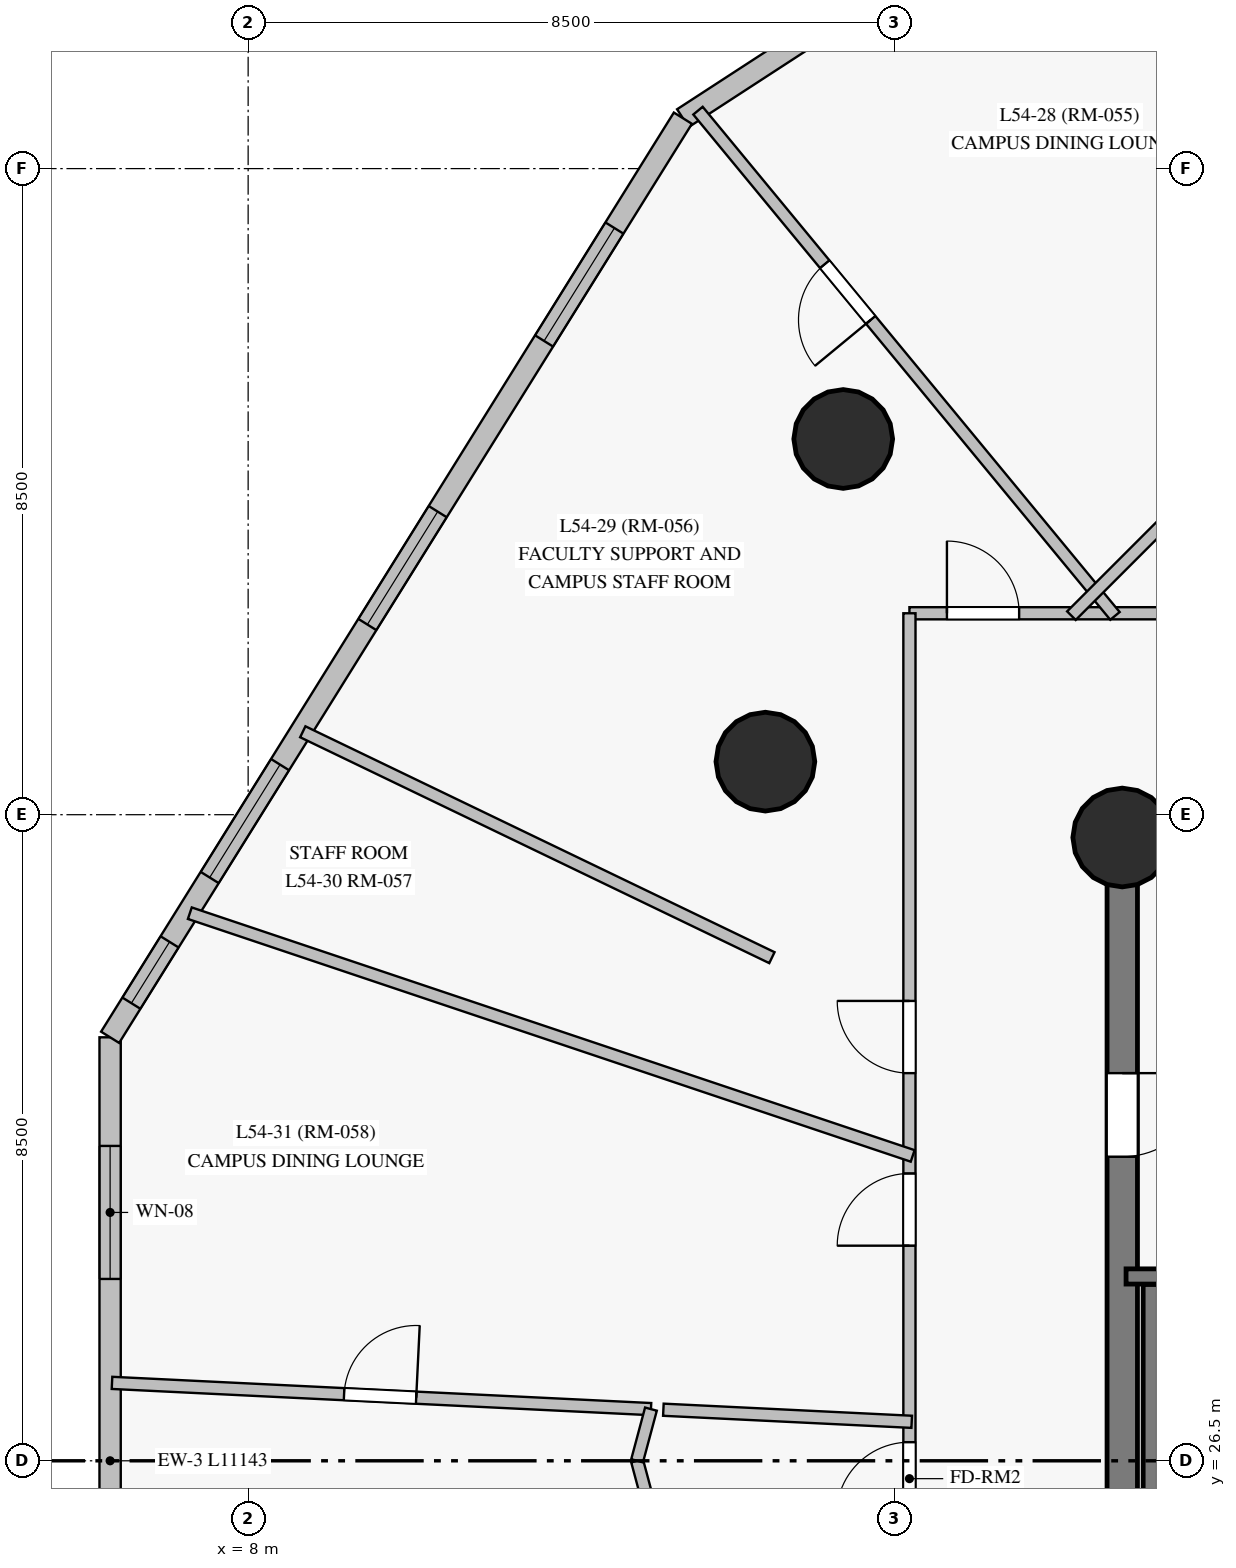
"""IFC4 building model, lengths in metres.
Left out: names, types, materials, properties, quantities, classifications, styles, units other than length and angle.
Written with IfcOpenShell. Run it as: python <this file> out.ifc"""

import sys

from ifc_helpers import new_model, si_unit, direction, frame, frame_2d, origin, origin_with_axes, origin_2d, place, context, subcontext, project, spatial, rectangle, circle, extrude, source, transform, mapped, element, fill, save


model = new_model("IFC4")
c1 = context("Model", 3, precision=1e-05, world=origin(), true_north=direction((0.0, 1.0)))
c2 = subcontext(c1, "Body", "Model", "MODEL_VIEW")
j1 = project(units=[si_unit("LENGTHUNIT", "METRE"), si_unit("PLANEANGLEUNIT", "RADIAN")], contexts=[c1])
p1 = place(None, origin())
s1 = spatial("IfcSite", under=j1, at=p1, CompositionType="ELEMENT")
p2 = place(p1, origin())
s2 = spatial("IfcBuilding", under=s1, at=p2, CompositionType="ELEMENT")
p3 = place(p2, frame((0.0, 0.0, 187.05)))
s3 = spatial("IfcBuildingStorey", under=s2, at=p3, CompositionType="ELEMENT", Elevation=187.05)
p4 = place(p3, frame((26.55, 34.7, 0.0), z_axis=(0.0, 0.0, 1.0), x_axis=(-1.0, 0.0, 0.0)))
e1 = element("IfcWall", 1, at=p4, inside=s3, PredefinedType="SHEAR", context=c2, shape_type="SweptSolid", body=[
    extrude(rectangle(XDim=7.05, YDim=0.4, at=frame_2d((3.525, 0.0))), origin(), (0.0, 0.0, 1.0), 2.825),
])
p5 = place(p4, frame((4.25, 0.0, 0.0)))
e2 = element("IfcOpeningElement", 2, at=p5, cuts=e1, PredefinedType="OPENING", context=c2, shape_type="SweptSolid", body=[
    extrude(rectangle(XDim=1.1, YDim=2.15, at=frame_2d((0.55, 1.075))), frame((0.0, 0.21, 0.0), z_axis=(0.0, -1.0, 0.0), x_axis=(1.0, 0.0, 0.0)), (0.0, 0.0, 1.0), 0.42),
])
p6 = place(p3, frame((19.5, 34.7, 0.0), z_axis=(0.0, 0.0, 1.0), x_axis=(0.0, -1.0, 0.0)))
e3 = element("IfcWall", 3, at=p6, inside=s3, PredefinedType="SHEAR", context=c2, shape_type="SweptSolid", body=[
    extrude(rectangle(XDim=16.4, YDim=0.4, at=frame_2d((8.2, 0.0))), origin(), (0.0, 0.0, 1.0), 2.825),
])
p7 = place(p6, frame((3.1, 0.0, 0.0)))
e4 = element("IfcOpeningElement", 4, at=p7, cuts=e3, PredefinedType="OPENING", context=c2, shape_type="SweptSolid", body=[
    extrude(rectangle(XDim=1.1, YDim=2.15, at=frame_2d((0.55, 1.075))), frame((0.0, 0.21, 0.0), z_axis=(0.0, -1.0, 0.0), x_axis=(1.0, 0.0, 0.0)), (0.0, 0.0, 1.0), 0.42),
])
m1 = source(origin_with_axes(), c2, "Body", "SweptSolid", [
    extrude(circle(Radius=0.65, at=origin_2d()), origin(), (0.0, 0.0, 1.0), 3.05),
])
for number, where, z_axis, x_axis in (
    (5, (19.5, 34.7, 0.0), (0.0, 0.0, 1.0), (1.0, 0.0, 0.0)),
    (6, (15.829, 39.943, 0.0), (0.0, 0.0, 1.0), (1.0, 0.0, 0.0)),
    (7, (14.805, 35.698, 0.0), (0.0, 0.0, 1.0), (1.0, 0.0, 0.0)),
):
    element("IfcColumn", number, at=place(p3, frame(where, z_axis=z_axis, x_axis=x_axis)), inside=s3, PredefinedType="COLUMN", context=c2, shape_type="MappedRepresentation", body=[
        mapped(m1, transform((0.0, 0.0, 0.0), scale=1.0)),
    ])
p8 = place(p3, frame((6.184, 32.071, 0.0), z_axis=(0.0, 0.0, 1.0), x_axis=(0.0, -1.0, 0.0)))
e8 = element("IfcWall", 8, at=p8, inside=s3, PredefinedType="SOLIDWALL", context=c2, shape_type="SweptSolid", body=[
    extrude(rectangle(XDim=11.143, YDim=0.28, at=frame_2d((5.571, 0.0))), origin(), (0.0, 0.0, 1.0), 2.825),
])
p9 = place(p8, frame((1.429, 0.0, 0.85)))
e9 = element("IfcOpeningElement", 9, at=p9, cuts=e8, PredefinedType="OPENING", context=c2, shape_type="SweptSolid", body=[
    extrude(rectangle(XDim=1.75, YDim=1.65, at=frame_2d((0.875, 0.825))), frame((0.0, 0.15, 0.0), z_axis=(0.0, -1.0, 0.0), x_axis=(1.0, 0.0, 0.0)), (0.0, 0.0, 1.0), 0.3),
])
p10 = place(p8, frame((6.94, 0.0, 0.85)))
e10 = element("IfcOpeningElement", 10, at=p10, cuts=e8, PredefinedType="OPENING", context=c2, shape_type="SweptSolid", body=[
    extrude(rectangle(XDim=1.75, YDim=1.65, at=frame_2d((0.875, 0.825))), frame((0.0, 0.15, 0.0), z_axis=(0.0, -1.0, 0.0), x_axis=(1.0, 0.0, 0.0)), (0.0, 0.0, 1.0), 0.3),
])
p11 = place(p3, frame((22.307, 49.747, 0.0), z_axis=(0.0, 0.0, 1.0), x_axis=(-0.838379351777, -0.545087206339, 0.0)))
e11 = element("IfcWall", 11, at=p11, inside=s3, PredefinedType="SOLIDWALL", context=c2, shape_type="SweptSolid", body=[
    extrude(rectangle(XDim=10.243, YDim=0.28, at=frame_2d((5.122, 0.0))), origin(), (0.0, 0.0, 1.0), 2.825),
])
p12 = place(p11, frame((0.563, 0.0, 0.85)))
e12 = element("IfcOpeningElement", 12, at=p12, cuts=e11, PredefinedType="OPENING", context=c2, shape_type="SweptSolid", body=[
    extrude(rectangle(XDim=1.55, YDim=1.65, at=frame_2d((0.775, 0.825))), frame((0.0, 0.15, 0.0), z_axis=(0.0, -1.0, 0.0), x_axis=(1.0, 0.0, 0.0)), (0.0, 0.0, 1.0), 0.3),
])
p13 = place(p11, frame((5.442, 0.0, 0.85)))
e13 = element("IfcOpeningElement", 13, at=p13, cuts=e11, PredefinedType="OPENING", context=c2, shape_type="SweptSolid", body=[
    extrude(rectangle(XDim=1.75, YDim=1.65, at=frame_2d((0.875, 0.825))), frame((0.0, 0.15, 0.0), z_axis=(0.0, -1.0, 0.0), x_axis=(1.0, 0.0, 0.0)), (0.0, 0.0, 1.0), 0.3),
])
p14 = place(p3, frame((13.719, 44.163, 0.0), z_axis=(0.0, 0.0, 1.0), x_axis=(-0.52888179639, -0.848695496304, 0.0)))
e14 = element("IfcWall", 14, at=p14, inside=s3, PredefinedType="SOLIDWALL", context=c2, shape_type="SweptSolid", body=[
    extrude(rectangle(XDim=14.248, YDim=0.28, at=frame_2d((7.124, 0.0))), origin(), (0.0, 0.0, 1.0), 2.825),
])
p15 = place(p14, frame((1.703, 0.0, 0.85)))
e15 = element("IfcOpeningElement", 15, at=p15, cuts=e14, PredefinedType="OPENING", context=c2, shape_type="SweptSolid", body=[
    extrude(rectangle(XDim=1.75, YDim=1.65, at=frame_2d((0.875, 0.825))), frame((0.0, 0.15, 0.0), z_axis=(0.0, -1.0, 0.0), x_axis=(1.0, 0.0, 0.0)), (0.0, 0.0, 1.0), 0.3),
])
p16 = place(p14, frame((6.099, 0.0, 0.85)))
e16 = element("IfcOpeningElement", 16, at=p16, cuts=e14, PredefinedType="OPENING", context=c2, shape_type="SweptSolid", body=[
    extrude(rectangle(XDim=1.75, YDim=1.65, at=frame_2d((0.875, 0.825))), frame((0.0, 0.15, 0.0), z_axis=(0.0, -1.0, 0.0), x_axis=(1.0, 0.0, 0.0)), (0.0, 0.0, 1.0), 0.3),
])
p17 = place(p14, frame((10.021, 0.0, 0.85)))
e17 = element("IfcOpeningElement", 17, at=p17, cuts=e14, PredefinedType="OPENING", context=c2, shape_type="SweptSolid", body=[
    extrude(rectangle(XDim=1.75, YDim=1.65, at=frame_2d((0.875, 0.825))), frame((0.0, 0.15, 0.0), z_axis=(0.0, -1.0, 0.0), x_axis=(1.0, 0.0, 0.0)), (0.0, 0.0, 1.0), 0.3),
])
p18 = place(p14, frame((12.769, 0.0, 0.85)))
e18 = element("IfcOpeningElement", 18, at=p18, cuts=e14, PredefinedType="OPENING", context=c2, shape_type="SweptSolid", body=[
    extrude(rectangle(XDim=0.95, YDim=1.5, at=frame_2d((0.475, 0.75))), frame((0.0, 0.15, 0.0), z_axis=(0.0, -1.0, 0.0), x_axis=(1.0, 0.0, 0.0)), (0.0, 0.0, 1.0), 0.3),
])
p19 = place(p3, frame((19.875, 21.32, 0.0), z_axis=(0.0, 0.0, 1.0), x_axis=(0.0, 1.0, 0.0)))
e19 = element("IfcWall", 19, at=p19, inside=s3, PredefinedType="SHEAR", context=c2, shape_type="SweptSolid", body=[
    extrude(rectangle(XDim=7.5, YDim=0.2, at=frame_2d((3.75, 0.0))), origin(), (0.0, 0.0, 1.0), 2.825),
])
p20 = place(p3, frame((19.55, 28.925, 0.0), z_axis=(0.0, 0.0, 1.0), x_axis=(1.0, 0.0, 0.0)))
e20 = element("IfcWall", 20, at=p20, inside=s3, PredefinedType="SHEAR", context=c2, shape_type="SweptSolid", body=[
    extrude(rectangle(XDim=3.995, YDim=0.2, at=frame_2d((1.998, 0.0))), origin(), (0.0, 0.0, 1.0), 2.825),
])
p21 = place(p3, frame((16.7, 37.65, 0.0), z_axis=(0.0, 0.0, 1.0), x_axis=(1.0, 0.0, 0.0)))
e21 = element("IfcWall", 21, at=p21, inside=s3, PredefinedType="PARTITIONING", context=c2, shape_type="SweptSolid", body=[
    extrude(rectangle(XDim=23.5, YDim=0.16, at=frame_2d((11.75, 0.0))), origin(), (0.0, 0.0, 1.0), 2.375),
])
p22 = place(p21, frame((21.043, 0.0, 0.0)))
e22 = element("IfcOpeningElement", 22, at=p22, cuts=e21, PredefinedType="OPENING", context=c2, shape_type="SweptSolid", body=[
    extrude(rectangle(XDim=0.95, YDim=2.15, at=frame_2d((0.475, 1.075))), frame((0.0, 0.09, 0.0), z_axis=(0.0, -1.0, 0.0), x_axis=(1.0, 0.0, 0.0)), (0.0, 0.0, 1.0), 0.18),
])
p23 = place(p21, frame((17.79, 0.0, 0.0)))
e23 = element("IfcOpeningElement", 23, at=p23, cuts=e21, PredefinedType="OPENING", context=c2, shape_type="SweptSolid", body=[
    extrude(rectangle(XDim=0.95, YDim=2.15, at=frame_2d((0.475, 1.075))), frame((0.0, 0.09, 0.0), z_axis=(0.0, -1.0, 0.0), x_axis=(1.0, 0.0, 0.0)), (0.0, 0.0, 1.0), 0.18),
])
p24 = place(p21, frame((15.763, 0.0, 0.0)))
e24 = element("IfcOpeningElement", 24, at=p24, cuts=e21, PredefinedType="OPENING", context=c2, shape_type="SweptSolid", body=[
    extrude(rectangle(XDim=0.95, YDim=2.15, at=frame_2d((0.475, 1.075))), frame((0.0, 0.09, 0.0), z_axis=(0.0, -1.0, 0.0), x_axis=(1.0, 0.0, 0.0)), (0.0, 0.0, 1.0), 0.18),
])
p25 = place(p21, frame((13.003, 0.0, 0.0)))
e25 = element("IfcOpeningElement", 25, at=p25, cuts=e21, PredefinedType="OPENING", context=c2, shape_type="SweptSolid", body=[
    extrude(rectangle(XDim=0.95, YDim=2.15, at=frame_2d((0.475, 1.075))), frame((0.0, 0.09, 0.0), z_axis=(0.0, -1.0, 0.0), x_axis=(1.0, 0.0, 0.0)), (0.0, 0.0, 1.0), 0.18),
])
p26 = place(p21, frame((11.275, 0.0, 0.0)))
e26 = element("IfcOpeningElement", 26, at=p26, cuts=e21, PredefinedType="OPENING", context=c2, shape_type="SweptSolid", body=[
    extrude(rectangle(XDim=0.95, YDim=2.15, at=frame_2d((0.475, 1.075))), frame((0.0, 0.09, 0.0), z_axis=(0.0, -1.0, 0.0), x_axis=(1.0, 0.0, 0.0)), (0.0, 0.0, 1.0), 0.18),
])
p27 = place(p21, frame((7.75, 0.0, 0.0)))
e27 = element("IfcOpeningElement", 27, at=p27, cuts=e21, PredefinedType="OPENING", context=c2, shape_type="SweptSolid", body=[
    extrude(rectangle(XDim=0.95, YDim=2.15, at=frame_2d((0.475, 1.075))), frame((0.0, 0.09, 0.0), z_axis=(0.0, -1.0, 0.0), x_axis=(1.0, 0.0, 0.0)), (0.0, 0.0, 1.0), 0.18),
])
p28 = place(p21, frame((0.493, 0.0, 0.0)))
e28 = element("IfcOpeningElement", 28, at=p28, cuts=e21, PredefinedType="OPENING", context=c2, shape_type="SweptSolid", body=[
    extrude(rectangle(XDim=0.95, YDim=2.15, at=frame_2d((0.475, 1.075))), frame((0.0, 0.09, 0.0), z_axis=(0.0, -1.0, 0.0), x_axis=(1.0, 0.0, 0.0)), (0.0, 0.0, 1.0), 0.18),
])
p29 = place(p3, frame((16.7, 15.35, 0.0), z_axis=(0.0, 0.0, 1.0), x_axis=(0.0, 1.0, 0.0)))
e29 = element("IfcWall", 29, at=p29, inside=s3, PredefinedType="PARTITIONING", context=c2, shape_type="SweptSolid", body=[
    extrude(rectangle(XDim=22.3, YDim=0.16, at=frame_2d((11.15, 0.0))), origin(), (0.0, 0.0, 1.0), 2.275),
])
p30 = place(p29, frame((10.435, 0.0, 0.0)))
e30 = element("IfcOpeningElement", 30, at=p30, cuts=e29, PredefinedType="OPENING", context=c2, shape_type="SweptSolid", body=[
    extrude(rectangle(XDim=0.96, YDim=2.15, at=frame_2d((0.48, 1.075))), frame((0.0, 0.09, 0.0), z_axis=(0.0, -1.0, 0.0), x_axis=(1.0, 0.0, 0.0)), (0.0, 0.0, 1.0), 0.18),
])
p31 = place(p29, frame((2.469, 0.0, 0.0)))
e31 = element("IfcOpeningElement", 31, at=p31, cuts=e29, PredefinedType="OPENING", context=c2, shape_type="SweptSolid", body=[
    extrude(rectangle(XDim=0.95, YDim=2.15, at=frame_2d((0.475, 1.075))), frame((0.0, 0.09, 0.0), z_axis=(0.0, -1.0, 0.0), x_axis=(1.0, 0.0, 0.0)), (0.0, 0.0, 1.0), 0.18),
])
p32 = place(p29, frame((16.25, 0.0, 0.0)))
e32 = element("IfcOpeningElement", 32, at=p32, cuts=e29, PredefinedType="OPENING", context=c2, shape_type="SweptSolid", body=[
    extrude(rectangle(XDim=0.95, YDim=2.15, at=frame_2d((0.475, 1.075))), frame((0.0, 0.09, 0.0), z_axis=(0.0, -1.0, 0.0), x_axis=(1.0, 0.0, 0.0)), (0.0, 0.0, 1.0), 0.18),
])
p33 = place(p29, frame((13.98, 0.0, 0.0)))
e33 = element("IfcOpeningElement", 33, at=p33, cuts=e29, PredefinedType="OPENING", context=c2, shape_type="SweptSolid", body=[
    extrude(rectangle(XDim=0.95, YDim=2.15, at=frame_2d((0.475, 1.075))), frame((0.0, 0.09, 0.0), z_axis=(0.0, -1.0, 0.0), x_axis=(1.0, 0.0, 0.0)), (0.0, 0.0, 1.0), 0.18),
])
p34 = place(p3, frame((16.743, 30.511, 0.0), z_axis=(0.0, 0.0, 1.0), x_axis=(-0.947987402287, 0.31830784644, 0.0)))
e34 = element("IfcWall", 34, at=p34, inside=s3, PredefinedType="PARTITIONING", context=c2, shape_type="SweptSolid", body=[
    extrude(rectangle(XDim=10.031, YDim=0.16, at=frame_2d((5.016, 0.0))), origin(), (0.0, 0.0, 1.0), 2.825),
])
p35 = place(p3, frame((19.404, 37.615, 0.0), z_axis=(0.0, 0.0, 1.0), x_axis=(-0.636513152023, 0.771265847358, 0.0)))
e35 = element("IfcWall", 35, at=p35, inside=s3, PredefinedType="PARTITIONING", context=c2, shape_type="SweptSolid", body=[
    extrude(rectangle(XDim=8.619, YDim=0.16, at=frame_2d((4.309, 0.0))), origin(), (0.0, 0.0, 1.0), 2.825),
])
p36 = place(p35, frame((5.049, 0.0, 0.0)))
e36 = element("IfcOpeningElement", 36, at=p36, cuts=e35, PredefinedType="OPENING", context=c2, shape_type="SweptSolid", body=[
    extrude(rectangle(XDim=0.95, YDim=2.15, at=frame_2d((0.475, 1.075))), frame((0.0, 0.09, 0.0), z_axis=(0.0, -1.0, 0.0), x_axis=(1.0, 0.0, 0.0)), (0.0, 0.0, 1.0), 0.18),
])
p37 = place(p3, frame((6.209, 27.525, 0.0), z_axis=(0.0, 0.0, 1.0), x_axis=(0.998816837253, -0.048630500925, 0.0)))
e37 = element("IfcWall", 37, at=p37, inside=s3, PredefinedType="PARTITIONING", context=c2, shape_type="SweptSolid", body=[
    extrude(rectangle(XDim=7.099, YDim=0.16, at=frame_2d((3.549, 0.0))), origin(), (0.0, 0.0, 1.0), 2.825),
])
p38 = place(p37, frame((3.057, 0.0, 0.0)))
e38 = element("IfcOpeningElement", 38, at=p38, cuts=e37, PredefinedType="OPENING", context=c2, shape_type="SweptSolid", body=[
    extrude(rectangle(XDim=0.95, YDim=2.15, at=frame_2d((0.475, 1.075))), frame((0.0, 0.09, 0.0), z_axis=(0.0, -1.0, 0.0), x_axis=(1.0, 0.0, 0.0)), (0.0, 0.0, 1.0), 0.18),
])
p39 = place(p3, frame((14.891, 33.119, 0.0), z_axis=(0.0, 0.0, 1.0), x_axis=(-0.900985674689, 0.433848837737, 0.0)))
e39 = element("IfcWall", 39, at=p39, inside=s3, PredefinedType="PARTITIONING", context=c2, shape_type="SweptSolid", body=[
    extrude(rectangle(XDim=6.85, YDim=0.16, at=frame_2d((3.425, 0.0))), origin(), (0.0, 0.0, 1.0), 2.825),
])
p40 = place(p3, frame((13.117, 26.5, 0.0), z_axis=(0.0, 0.0, 1.0), x_axis=(0.258802155336, -0.96593035173, 0.0)))
e40 = element("IfcWall", 40, at=p40, inside=s3, PredefinedType="PARTITIONING", context=c2, shape_type="SweptSolid", body=[
    extrude(rectangle(XDim=4.187, YDim=0.16, at=frame_2d((2.093, 0.0))), origin(), (0.0, 0.0, 1.0), 2.275),
])
p41 = place(p3, frame((13.463, 27.172, 0.0), z_axis=(0.0, 0.0, 1.0), x_axis=(0.998818809561, -0.048589974968, 0.0)))
e41 = element("IfcWall", 41, at=p41, inside=s3, PredefinedType="PARTITIONING", context=c2, shape_type="SweptSolid", body=[
    extrude(rectangle(XDim=3.271, YDim=0.16, at=frame_2d((1.635, 0.0))), origin(), (0.0, 0.0, 1.0), 2.825),
])
p42 = place(p3, frame((18.831, 37.618, 0.0), z_axis=(0.0, 0.0, 1.0), x_axis=(0.707106781187, 0.707106781187, 0.0)))
e42 = element("IfcWall", 42, at=p42, inside=s3, PredefinedType="PARTITIONING", context=c2, shape_type="SweptSolid", body=[
    extrude(rectangle(XDim=2.914, YDim=0.16, at=frame_2d((1.457, 0.0))), origin(), (0.0, 0.0, 1.0), 2.375),
])
p43 = place(p3, frame((13.299, 27.18, 0.0), z_axis=(0.0, 0.0, 1.0), x_axis=(-0.258741864149, -0.965946503558, 0.0)))
e43 = element("IfcWall", 43, at=p43, inside=s3, PredefinedType="PARTITIONING", context=c2, shape_type="SweptSolid", body=[
    extrude(rectangle(XDim=0.704, YDim=0.16, at=frame_2d((0.352, 0.0))), origin(), (0.0, 0.0, 1.0), 2.275),
])
m2 = source(origin_with_axes(), c2, "Body", "SweptSolid", [
    extrude(rectangle(XDim=1.75, YDim=1.65, at=frame_2d((0.875, 0.825))), frame((0.0, 0.03, 0.0), z_axis=(0.0, -1.0, 0.0), x_axis=(1.0, 0.0, 0.0)), (0.0, 0.0, 1.0), 0.06),
])
p44 = place(p9, origin())
e44 = element("IfcWindow", 44, at=p44, inside=s3, PartitioningType="SINGLE_PANEL", PredefinedType="WINDOW", context=c2, shape_type="MappedRepresentation", body=[
    mapped(m2, transform((0.0, 0.0, 0.0), scale=1.0)),
])
fill(e9, e44)
p45 = place(p15, origin())
e45 = element("IfcWindow", 45, at=p45, inside=s3, PartitioningType="SINGLE_PANEL", PredefinedType="WINDOW", context=c2, shape_type="MappedRepresentation", body=[
    mapped(m2, transform((0.0, 0.0, 0.0), scale=1.0)),
])
fill(e15, e45)
p46 = place(p16, origin())
e46 = element("IfcWindow", 46, at=p46, inside=s3, PartitioningType="SINGLE_PANEL", PredefinedType="WINDOW", context=c2, shape_type="MappedRepresentation", body=[
    mapped(m2, transform((0.0, 0.0, 0.0), scale=1.0)),
])
fill(e16, e46)
p47 = place(p17, origin())
e47 = element("IfcWindow", 47, at=p47, inside=s3, PartitioningType="SINGLE_PANEL", PredefinedType="WINDOW", context=c2, shape_type="MappedRepresentation", body=[
    mapped(m2, transform((0.0, 0.0, 0.0), scale=1.0)),
])
fill(e17, e47)
m3 = source(origin_with_axes(), c2, "Body", "SweptSolid", [
    extrude(rectangle(XDim=0.95, YDim=1.5, at=frame_2d((0.475, 0.75))), frame((0.0, 0.03, 0.0), z_axis=(0.0, -1.0, 0.0), x_axis=(1.0, 0.0, 0.0)), (0.0, 0.0, 1.0), 0.06),
])
p48 = place(p18, origin())
e48 = element("IfcWindow", 48, at=p48, inside=s3, PartitioningType="SINGLE_PANEL", PredefinedType="WINDOW", context=c2, shape_type="MappedRepresentation", body=[
    mapped(m3, transform((0.0, 0.0, 0.0), scale=1.0)),
])
fill(e18, e48)
m4 = source(origin_with_axes(), c2, "Body", "SweptSolid", [
    extrude(rectangle(XDim=1.1, YDim=2.15, at=frame_2d((0.55, 1.075))), frame((0.0, 0.025, 0.0), z_axis=(0.0, -1.0, 0.0), x_axis=(1.0, 0.0, 0.0)), (0.0, 0.0, 1.0), 0.05),
])
p49 = place(p7, origin())
e49 = element("IfcDoor", 49, at=p49, inside=s3, OperationType="SINGLE_SWING_LEFT", PredefinedType="DOOR", context=c2, shape_type="MappedRepresentation", body=[
    mapped(m4, transform((0.0, 0.0, 0.0), scale=1.0)),
])
fill(e4, e49)
m5 = source(origin_with_axes(), c2, "Body", "SweptSolid", [
    extrude(rectangle(XDim=0.96, YDim=2.15, at=frame_2d((0.48, 1.075))), frame((0.0, 0.025, 0.0), z_axis=(0.0, -1.0, 0.0), x_axis=(1.0, 0.0, 0.0)), (0.0, 0.0, 1.0), 0.05),
])
p50 = place(p30, origin())
e50 = element("IfcDoor", 50, at=p50, inside=s3, OperationType="SINGLE_SWING_LEFT", PredefinedType="DOOR", context=c2, shape_type="MappedRepresentation", body=[
    mapped(m5, transform((0.0, 0.0, 0.0), scale=1.0)),
])
fill(e30, e50)
m6 = source(origin_with_axes(), c2, "Body", "SweptSolid", [
    extrude(rectangle(XDim=0.95, YDim=2.15, at=frame_2d((0.475, 1.075))), frame((0.0, 0.025, 0.0), z_axis=(0.0, -1.0, 0.0), x_axis=(1.0, 0.0, 0.0)), (0.0, 0.0, 1.0), 0.05),
])
p51 = place(p28, origin())
e51 = element("IfcDoor", 51, at=p51, inside=s3, OperationType="SINGLE_SWING_LEFT", PredefinedType="DOOR", context=c2, shape_type="MappedRepresentation", body=[
    mapped(m6, transform((0.0, 0.0, 0.0), scale=1.0)),
])
fill(e28, e51)
p52 = place(p32, origin())
e52 = element("IfcDoor", 52, at=p52, inside=s3, OperationType="SINGLE_SWING_RIGHT", PredefinedType="DOOR", context=c2, shape_type="MappedRepresentation", body=[
    mapped(m6, transform((0.0, 0.0, 0.0), scale=1.0)),
])
fill(e32, e52)
p53 = place(p33, origin())
e53 = element("IfcDoor", 53, at=p53, inside=s3, OperationType="SINGLE_SWING_LEFT", PredefinedType="DOOR", context=c2, shape_type="MappedRepresentation", body=[
    mapped(m6, transform((0.0, 0.0, 0.0), scale=1.0)),
])
fill(e33, e53)
p54 = place(p38, origin())
e54 = element("IfcDoor", 54, at=p54, inside=s3, OperationType="SINGLE_SWING_RIGHT", PredefinedType="DOOR", context=c2, shape_type="MappedRepresentation", body=[
    mapped(m6, transform((0.0, 0.0, 0.0), scale=1.0)),
])
fill(e38, e54)
p55 = place(p36, origin())
e55 = element("IfcDoor", 55, at=p55, inside=s3, OperationType="SINGLE_SWING_LEFT", PredefinedType="DOOR", context=c2, shape_type="MappedRepresentation", body=[
    mapped(m6, transform((0.0, 0.0, 0.0), scale=1.0)),
])
fill(e36, e55)
save(model, sys.argv[1])
